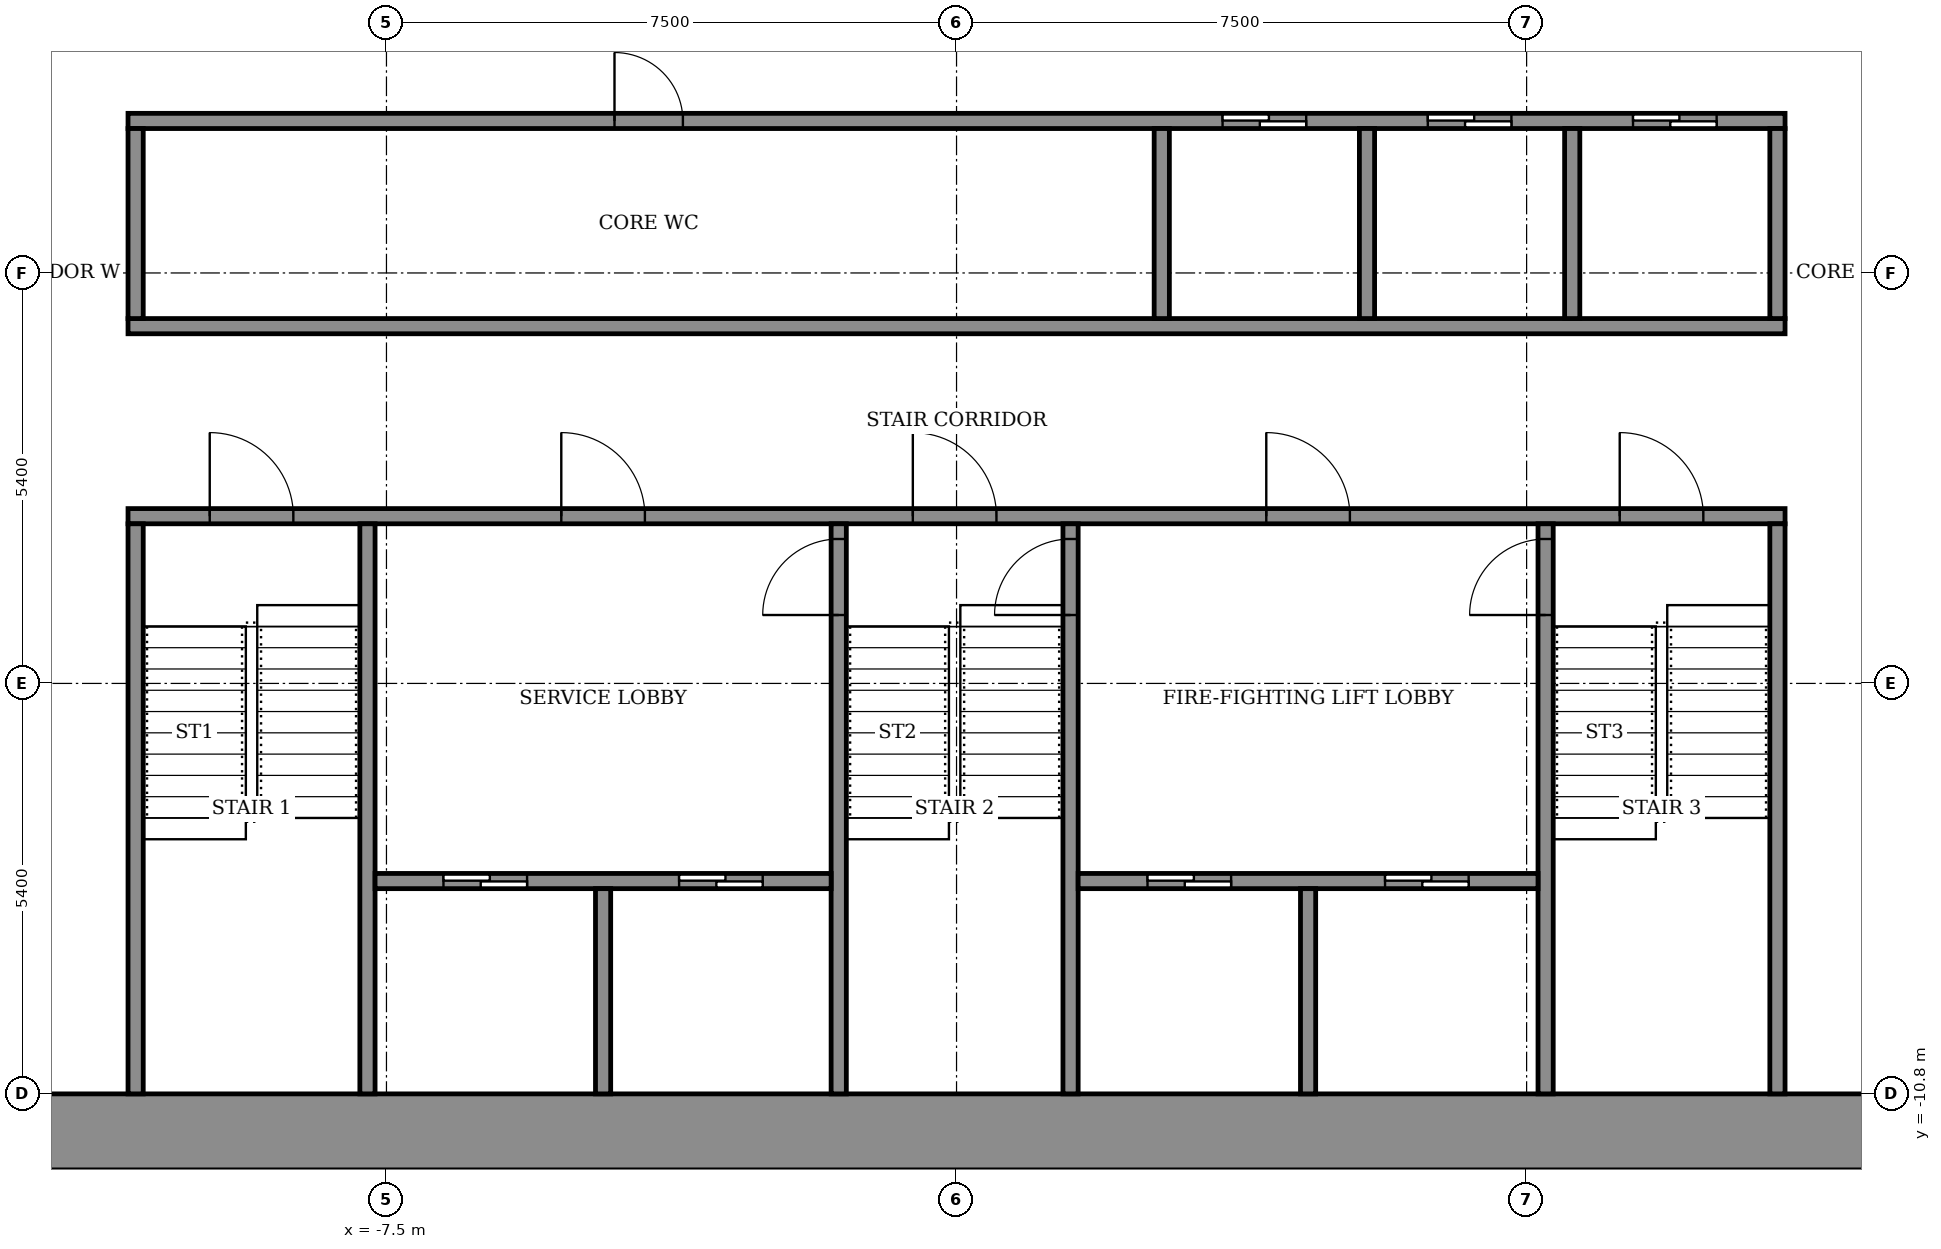
"""IFC4 building model, lengths in metres.
Left out: names, types, materials, properties, quantities, classifications, styles, units other than length and angle.
Written with IfcOpenShell. Run it as: python <this file> out.ifc"""

import sys

from ifc_helpers import new_model, si_unit, direction, frame, frame_2d, origin, place, context, subcontext, project, spatial, rectangle, extrude, element, fill, save


model = new_model("IFC4")
c1 = context("Model", 3, precision=1e-05, world=origin(), true_north=direction((0.0, 1.0)))
c2 = subcontext(c1, "Body", "Model", "MODEL_VIEW")
j1 = project(units=[si_unit("LENGTHUNIT", "METRE"), si_unit("PLANEANGLEUNIT", "RADIAN")], contexts=[c1])
p1 = place(None, origin())
s1 = spatial("IfcSite", under=j1, at=p1, CompositionType="ELEMENT")
p2 = place(p1, origin())
s2 = spatial("IfcBuilding", under=s1, at=p2, CompositionType="ELEMENT")
p3 = place(p2, frame((0.0, 0.0, 137.3)))
s3 = spatial("IfcBuildingStorey", under=s2, at=p3, CompositionType="ELEMENT", Elevation=137.3)
p4 = place(p3, frame((-14.8, -11.3, 0.0), z_axis=(0.0, 0.0, 1.0), x_axis=(1.0, 0.0, 0.0)))
e1 = element("IfcWall", 1, at=p4, inside=s3, PredefinedType="SHEAR", context=c2, shape_type="SweptSolid", body=[
    extrude(rectangle(XDim=29.6, YDim=1.0, at=frame_2d((14.8, 0.0))), origin(), (0.0, 0.0, 1.0), 3.6),
])
p5 = place(p3, frame((-10.9, -3.2, 0.0), z_axis=(0.0, 0.0, 1.0), x_axis=(1.0, 0.0, 0.0)))
e2 = element("IfcWall", 2, at=p5, inside=s3, PredefinedType="SHEAR", context=c2, shape_type="SweptSolid", body=[
    extrude(rectangle(XDim=21.8, YDim=0.2, at=frame_2d((10.9, 0.0))), origin(), (0.0, 0.0, 1.0), 3.05),
])
p6 = place(p5, frame((1.075, 0.0, 0.0)))
e3 = element("IfcOpeningElement", 3, at=p6, cuts=e2, PredefinedType="OPENING", context=c2, shape_type="SweptSolid", body=[
    extrude(rectangle(XDim=1.1, YDim=2.1, at=frame_2d((0.55, 1.05))), frame((0.0, 0.11, 0.0), z_axis=(0.0, -1.0, 0.0), x_axis=(1.0, 0.0, 0.0)), (0.0, 0.0, 1.0), 0.22),
])
p7 = place(p5, frame((10.325, 0.0, 0.0)))
e4 = element("IfcOpeningElement", 4, at=p7, cuts=e2, PredefinedType="OPENING", context=c2, shape_type="SweptSolid", body=[
    extrude(rectangle(XDim=1.1, YDim=2.1, at=frame_2d((0.55, 1.05))), frame((0.0, 0.11, 0.0), z_axis=(0.0, -1.0, 0.0), x_axis=(1.0, 0.0, 0.0)), (0.0, 0.0, 1.0), 0.22),
])
p8 = place(p5, frame((19.625, 0.0, 0.0)))
e5 = element("IfcOpeningElement", 5, at=p8, cuts=e2, PredefinedType="OPENING", context=c2, shape_type="SweptSolid", body=[
    extrude(rectangle(XDim=1.1, YDim=2.1, at=frame_2d((0.55, 1.05))), frame((0.0, 0.11, 0.0), z_axis=(0.0, -1.0, 0.0), x_axis=(1.0, 0.0, 0.0)), (0.0, 0.0, 1.0), 0.22),
])
p9 = place(p5, frame((5.7, 0.0, 0.0)))
e6 = element("IfcOpeningElement", 6, at=p9, cuts=e2, PredefinedType="OPENING", context=c2, shape_type="SweptSolid", body=[
    extrude(rectangle(XDim=1.1, YDim=2.1, at=frame_2d((0.55, 1.05))), frame((0.0, 0.11, 0.0), z_axis=(0.0, -1.0, 0.0), x_axis=(1.0, 0.0, 0.0)), (0.0, 0.0, 1.0), 0.22),
])
p10 = place(p5, frame((14.975, 0.0, 0.0)))
e7 = element("IfcOpeningElement", 7, at=p10, cuts=e2, PredefinedType="OPENING", context=c2, shape_type="SweptSolid", body=[
    extrude(rectangle(XDim=1.1, YDim=2.1, at=frame_2d((0.55, 1.05))), frame((0.0, 0.11, 0.0), z_axis=(0.0, -1.0, 0.0), x_axis=(1.0, 0.0, 0.0)), (0.0, 0.0, 1.0), 0.22),
])
p11 = place(p3, frame((-10.9, -0.7, 0.0), z_axis=(0.0, 0.0, 1.0), x_axis=(1.0, 0.0, 0.0)))
e8 = element("IfcWall", 8, at=p11, inside=s3, PredefinedType="SHEAR", context=c2, shape_type="SweptSolid", body=[
    extrude(rectangle(XDim=21.8, YDim=0.2, at=frame_2d((10.9, 0.0))), origin(), (0.0, 0.0, 1.0), 3.05),
])
p12 = place(p3, frame((-10.9, 2.0, 0.0), z_axis=(0.0, 0.0, 1.0), x_axis=(1.0, 0.0, 0.0)))
e9 = element("IfcWall", 9, at=p12, inside=s3, PredefinedType="SHEAR", context=c2, shape_type="SweptSolid", body=[
    extrude(rectangle(XDim=21.8, YDim=0.2, at=frame_2d((10.9, 0.0))), origin(), (0.0, 0.0, 1.0), 3.05),
])
p13 = place(p12, frame((14.4, 0.0, 0.0)))
e10 = element("IfcOpeningElement", 10, at=p13, cuts=e9, PredefinedType="OPENING", context=c2, shape_type="SweptSolid", body=[
    extrude(rectangle(XDim=1.1, YDim=2.1, at=frame_2d((0.55, 1.05))), frame((0.0, 0.11, 0.0), z_axis=(0.0, -1.0, 0.0), x_axis=(1.0, 0.0, 0.0)), (0.0, 0.0, 1.0), 0.22),
])
p14 = place(p12, frame((17.1, 0.0, 0.0)))
e11 = element("IfcOpeningElement", 11, at=p14, cuts=e9, PredefinedType="OPENING", context=c2, shape_type="SweptSolid", body=[
    extrude(rectangle(XDim=1.1, YDim=2.1, at=frame_2d((0.55, 1.05))), frame((0.0, 0.11, 0.0), z_axis=(0.0, -1.0, 0.0), x_axis=(1.0, 0.0, 0.0)), (0.0, 0.0, 1.0), 0.22),
])
p15 = place(p12, frame((19.8, 0.0, 0.0)))
e12 = element("IfcOpeningElement", 12, at=p15, cuts=e9, PredefinedType="OPENING", context=c2, shape_type="SweptSolid", body=[
    extrude(rectangle(XDim=1.1, YDim=2.1, at=frame_2d((0.55, 1.05))), frame((0.0, 0.11, 0.0), z_axis=(0.0, -1.0, 0.0), x_axis=(1.0, 0.0, 0.0)), (0.0, 0.0, 1.0), 0.22),
])
p16 = place(p12, frame((6.4, 0.0, 0.0)))
e13 = element("IfcOpeningElement", 13, at=p16, cuts=e9, PredefinedType="OPENING", context=c2, shape_type="SweptSolid", body=[
    extrude(rectangle(XDim=0.9, YDim=2.1, at=frame_2d((0.45, 1.05))), frame((0.0, 0.11, 0.0), z_axis=(0.0, -1.0, 0.0), x_axis=(1.0, 0.0, 0.0)), (0.0, 0.0, 1.0), 0.22),
])
for number, where, z_axis, x_axis in (
    (14, (-10.8, -10.8, 0.0), (0.0, 0.0, 1.0), (0.0, 1.0, 0.0)),
    (15, (-7.75, -10.8, 0.0), (0.0, 0.0, 1.0), (0.0, 1.0, 0.0)),
):
    element("IfcWall", number, at=place(p3, frame(where, z_axis=z_axis, x_axis=x_axis)), inside=s3, PredefinedType="SHEAR", context=c2, shape_type="SweptSolid", body=[
        extrude(rectangle(XDim=7.5, YDim=0.2, at=frame_2d((3.75, 0.0))), origin(), (0.0, 0.0, 1.0), 3.05),
    ])
p17 = place(p3, frame((-1.55, -10.8, 0.0), z_axis=(0.0, 0.0, 1.0), x_axis=(0.0, 1.0, 0.0)))
e16 = element("IfcWall", 16, at=p17, inside=s3, PredefinedType="SHEAR", context=c2, shape_type="SweptSolid", body=[
    extrude(rectangle(XDim=7.5, YDim=0.2, at=frame_2d((3.75, 0.0))), origin(), (0.0, 0.0, 1.0), 3.05),
])
p18 = place(p17, frame((6.3, 0.0, 0.0)))
e17 = element("IfcOpeningElement", 17, at=p18, cuts=e16, PredefinedType="OPENING", context=c2, shape_type="SweptSolid", body=[
    extrude(rectangle(XDim=1.0, YDim=2.1, at=frame_2d((0.5, 1.05))), frame((0.0, 0.11, 0.0), z_axis=(0.0, -1.0, 0.0), x_axis=(1.0, 0.0, 0.0)), (0.0, 0.0, 1.0), 0.22),
])
p19 = place(p3, frame((1.5, -10.8, 0.0), z_axis=(0.0, 0.0, 1.0), x_axis=(0.0, 1.0, 0.0)))
e18 = element("IfcWall", 18, at=p19, inside=s3, PredefinedType="SHEAR", context=c2, shape_type="SweptSolid", body=[
    extrude(rectangle(XDim=7.5, YDim=0.2, at=frame_2d((3.75, 0.0))), origin(), (0.0, 0.0, 1.0), 3.05),
])
p20 = place(p19, frame((6.3, 0.0, 0.0)))
e19 = element("IfcOpeningElement", 19, at=p20, cuts=e18, PredefinedType="OPENING", context=c2, shape_type="SweptSolid", body=[
    extrude(rectangle(XDim=1.0, YDim=2.1, at=frame_2d((0.5, 1.05))), frame((0.0, 0.11, 0.0), z_axis=(0.0, -1.0, 0.0), x_axis=(1.0, 0.0, 0.0)), (0.0, 0.0, 1.0), 0.22),
])
p21 = place(p3, frame((7.75, -10.8, 0.0), z_axis=(0.0, 0.0, 1.0), x_axis=(0.0, 1.0, 0.0)))
e20 = element("IfcWall", 20, at=p21, inside=s3, PredefinedType="SHEAR", context=c2, shape_type="SweptSolid", body=[
    extrude(rectangle(XDim=7.5, YDim=0.2, at=frame_2d((3.75, 0.0))), origin(), (0.0, 0.0, 1.0), 3.05),
])
p22 = place(p21, frame((6.3, 0.0, 0.0)))
e21 = element("IfcOpeningElement", 21, at=p22, cuts=e20, PredefinedType="OPENING", context=c2, shape_type="SweptSolid", body=[
    extrude(rectangle(XDim=1.0, YDim=2.1, at=frame_2d((0.5, 1.05))), frame((0.0, 0.11, 0.0), z_axis=(0.0, -1.0, 0.0), x_axis=(1.0, 0.0, 0.0)), (0.0, 0.0, 1.0), 0.22),
])
p23 = place(p3, frame((10.8, -10.8, 0.0), z_axis=(0.0, 0.0, 1.0), x_axis=(0.0, 1.0, 0.0)))
e22 = element("IfcWall", 22, at=p23, inside=s3, PredefinedType="SHEAR", context=c2, shape_type="SweptSolid", body=[
    extrude(rectangle(XDim=7.5, YDim=0.2, at=frame_2d((3.75, 0.0))), origin(), (0.0, 0.0, 1.0), 3.05),
])
p24 = place(p3, frame((-7.65, -8.0, 0.0), z_axis=(0.0, 0.0, 1.0), x_axis=(1.0, 0.0, 0.0)))
e23 = element("IfcWall", 23, at=p24, inside=s3, PredefinedType="SHEAR", context=c2, shape_type="SweptSolid", body=[
    extrude(rectangle(XDim=6.0, YDim=0.2, at=frame_2d((3.0, 0.0))), origin(), (0.0, 0.0, 1.0), 3.05),
])
p25 = place(p24, frame((0.9, 0.0, 0.0)))
e24 = element("IfcOpeningElement", 24, at=p25, cuts=e23, PredefinedType="OPENING", context=c2, shape_type="SweptSolid", body=[
    extrude(rectangle(XDim=1.1, YDim=2.1, at=frame_2d((0.55, 1.05))), frame((0.0, 0.11, 0.0), z_axis=(0.0, -1.0, 0.0), x_axis=(1.0, 0.0, 0.0)), (0.0, 0.0, 1.0), 0.22),
])
p26 = place(p24, frame((4.0, 0.0, 0.0)))
e25 = element("IfcOpeningElement", 25, at=p26, cuts=e23, PredefinedType="OPENING", context=c2, shape_type="SweptSolid", body=[
    extrude(rectangle(XDim=1.1, YDim=2.1, at=frame_2d((0.55, 1.05))), frame((0.0, 0.11, 0.0), z_axis=(0.0, -1.0, 0.0), x_axis=(1.0, 0.0, 0.0)), (0.0, 0.0, 1.0), 0.22),
])
p27 = place(p3, frame((-4.65, -10.8, 0.0), z_axis=(0.0, 0.0, 1.0), x_axis=(0.0, 1.0, 0.0)))
e26 = element("IfcWall", 26, at=p27, inside=s3, PredefinedType="SHEAR", context=c2, shape_type="SweptSolid", body=[
    extrude(rectangle(XDim=2.7, YDim=0.2, at=frame_2d((1.35, 0.0))), origin(), (0.0, 0.0, 1.0), 3.05),
])
p28 = place(p3, frame((1.6, -8.0, 0.0), z_axis=(0.0, 0.0, 1.0), x_axis=(1.0, 0.0, 0.0)))
e27 = element("IfcWall", 27, at=p28, inside=s3, PredefinedType="SHEAR", context=c2, shape_type="SweptSolid", body=[
    extrude(rectangle(XDim=6.05, YDim=0.2, at=frame_2d((3.025, 0.0))), origin(), (0.0, 0.0, 1.0), 3.05),
])
p29 = place(p28, frame((0.913, 0.0, 0.0)))
e28 = element("IfcOpeningElement", 28, at=p29, cuts=e27, PredefinedType="OPENING", context=c2, shape_type="SweptSolid", body=[
    extrude(rectangle(XDim=1.1, YDim=2.1, at=frame_2d((0.55, 1.05))), frame((0.0, 0.11, 0.0), z_axis=(0.0, -1.0, 0.0), x_axis=(1.0, 0.0, 0.0)), (0.0, 0.0, 1.0), 0.22),
])
p30 = place(p28, frame((4.038, 0.0, 0.0)))
e29 = element("IfcOpeningElement", 29, at=p30, cuts=e27, PredefinedType="OPENING", context=c2, shape_type="SweptSolid", body=[
    extrude(rectangle(XDim=1.1, YDim=2.1, at=frame_2d((0.55, 1.05))), frame((0.0, 0.11, 0.0), z_axis=(0.0, -1.0, 0.0), x_axis=(1.0, 0.0, 0.0)), (0.0, 0.0, 1.0), 0.22),
])
p31 = place(p3, frame((4.625, -10.8, 0.0), z_axis=(0.0, 0.0, 1.0), x_axis=(0.0, 1.0, 0.0)))
e30 = element("IfcWall", 30, at=p31, inside=s3, PredefinedType="SHEAR", context=c2, shape_type="SweptSolid", body=[
    extrude(rectangle(XDim=2.7, YDim=0.2, at=frame_2d((1.35, 0.0))), origin(), (0.0, 0.0, 1.0), 3.05),
])
p32 = place(p3, frame((-10.8, -0.6, 0.0), z_axis=(0.0, 0.0, 1.0), x_axis=(0.0, 1.0, 0.0)))
e31 = element("IfcWall", 31, at=p32, inside=s3, PredefinedType="STANDARD", context=c2, shape_type="SweptSolid", body=[
    extrude(rectangle(XDim=2.5, YDim=0.2, at=frame_2d((1.25, 0.0))), origin(), (0.0, 0.0, 1.0), 3.05),
])
for number, where, z_axis, x_axis in (
    (32, (2.7, -0.6, 0.0), (0.0, 0.0, 1.0), (0.0, 1.0, 0.0)),
    (33, (5.4, -0.6, 0.0), (0.0, 0.0, 1.0), (0.0, 1.0, 0.0)),
    (34, (8.1, -0.6, 0.0), (0.0, 0.0, 1.0), (0.0, 1.0, 0.0)),
    (35, (10.8, -0.6, 0.0), (0.0, 0.0, 1.0), (0.0, 1.0, 0.0)),
):
    element("IfcWall", number, at=place(p3, frame(where, z_axis=z_axis, x_axis=x_axis)), inside=s3, PredefinedType="SHEAR", context=c2, shape_type="SweptSolid", body=[
        extrude(rectangle(XDim=2.5, YDim=0.2, at=frame_2d((1.25, 0.0))), origin(), (0.0, 0.0, 1.0), 3.05),
    ])
p33 = place(p13, origin())
e36 = element("IfcDoor", 36, at=p33, inside=s3, OperationType="SLIDING_TO_LEFT", PredefinedType="DOOR", context=c2, shape_type="SweptSolid", body=[
    extrude(rectangle(XDim=1.1, YDim=2.1, at=frame_2d((0.55, 1.05))), frame((0.0, 0.025, 0.0), z_axis=(0.0, -1.0, 0.0), x_axis=(1.0, 0.0, 0.0)), (0.0, 0.0, 1.0), 0.05),
])
fill(e10, e36)
p34 = place(p14, origin())
e37 = element("IfcDoor", 37, at=p34, inside=s3, OperationType="SLIDING_TO_LEFT", PredefinedType="DOOR", context=c2, shape_type="SweptSolid", body=[
    extrude(rectangle(XDim=1.1, YDim=2.1, at=frame_2d((0.55, 1.05))), frame((0.0, 0.025, 0.0), z_axis=(0.0, -1.0, 0.0), x_axis=(1.0, 0.0, 0.0)), (0.0, 0.0, 1.0), 0.05),
])
fill(e11, e37)
p35 = place(p15, origin())
e38 = element("IfcDoor", 38, at=p35, inside=s3, OperationType="SLIDING_TO_LEFT", PredefinedType="DOOR", context=c2, shape_type="SweptSolid", body=[
    extrude(rectangle(XDim=1.1, YDim=2.1, at=frame_2d((0.55, 1.05))), frame((0.0, 0.025, 0.0), z_axis=(0.0, -1.0, 0.0), x_axis=(1.0, 0.0, 0.0)), (0.0, 0.0, 1.0), 0.05),
])
fill(e12, e38)
p36 = place(p16, origin())
e39 = element("IfcDoor", 39, at=p36, inside=s3, OperationType="SINGLE_SWING_RIGHT", PredefinedType="DOOR", context=c2, shape_type="SweptSolid", body=[
    extrude(rectangle(XDim=0.9, YDim=2.1, at=frame_2d((0.45, 1.05))), frame((0.0, 0.025, 0.0), z_axis=(0.0, -1.0, 0.0), x_axis=(1.0, 0.0, 0.0)), (0.0, 0.0, 1.0), 0.05),
])
fill(e13, e39)
p37 = place(p29, origin())
e40 = element("IfcDoor", 40, at=p37, inside=s3, OperationType="SLIDING_TO_LEFT", PredefinedType="DOOR", context=c2, shape_type="SweptSolid", body=[
    extrude(rectangle(XDim=1.1, YDim=2.1, at=frame_2d((0.55, 1.05))), frame((0.0, 0.025, 0.0), z_axis=(0.0, -1.0, 0.0), x_axis=(1.0, 0.0, 0.0)), (0.0, 0.0, 1.0), 0.05),
])
fill(e28, e40)
p38 = place(p25, origin())
e41 = element("IfcDoor", 41, at=p38, inside=s3, OperationType="SLIDING_TO_LEFT", PredefinedType="DOOR", context=c2, shape_type="SweptSolid", body=[
    extrude(rectangle(XDim=1.1, YDim=2.1, at=frame_2d((0.55, 1.05))), frame((0.0, 0.025, 0.0), z_axis=(0.0, -1.0, 0.0), x_axis=(1.0, 0.0, 0.0)), (0.0, 0.0, 1.0), 0.05),
])
fill(e24, e41)
p39 = place(p30, origin())
e42 = element("IfcDoor", 42, at=p39, inside=s3, OperationType="SLIDING_TO_LEFT", PredefinedType="DOOR", context=c2, shape_type="SweptSolid", body=[
    extrude(rectangle(XDim=1.1, YDim=2.1, at=frame_2d((0.55, 1.05))), frame((0.0, 0.025, 0.0), z_axis=(0.0, -1.0, 0.0), x_axis=(1.0, 0.0, 0.0)), (0.0, 0.0, 1.0), 0.05),
])
fill(e29, e42)
p40 = place(p26, origin())
e43 = element("IfcDoor", 43, at=p40, inside=s3, OperationType="SLIDING_TO_LEFT", PredefinedType="DOOR", context=c2, shape_type="SweptSolid", body=[
    extrude(rectangle(XDim=1.1, YDim=2.1, at=frame_2d((0.55, 1.05))), frame((0.0, 0.025, 0.0), z_axis=(0.0, -1.0, 0.0), x_axis=(1.0, 0.0, 0.0)), (0.0, 0.0, 1.0), 0.05),
])
fill(e25, e43)
p41 = place(p6, origin())
e44 = element("IfcDoor", 44, at=p41, inside=s3, OperationType="SINGLE_SWING_RIGHT", PredefinedType="DOOR", context=c2, shape_type="SweptSolid", body=[
    extrude(rectangle(XDim=1.1, YDim=2.1, at=frame_2d((0.55, 1.05))), frame((0.0, 0.025, 0.0), z_axis=(0.0, -1.0, 0.0), x_axis=(1.0, 0.0, 0.0)), (0.0, 0.0, 1.0), 0.05),
])
fill(e3, e44)
p42 = place(p7, origin())
e45 = element("IfcDoor", 45, at=p42, inside=s3, OperationType="SINGLE_SWING_RIGHT", PredefinedType="DOOR", context=c2, shape_type="SweptSolid", body=[
    extrude(rectangle(XDim=1.1, YDim=2.1, at=frame_2d((0.55, 1.05))), frame((0.0, 0.025, 0.0), z_axis=(0.0, -1.0, 0.0), x_axis=(1.0, 0.0, 0.0)), (0.0, 0.0, 1.0), 0.05),
])
fill(e4, e45)
p43 = place(p8, origin())
e46 = element("IfcDoor", 46, at=p43, inside=s3, OperationType="SINGLE_SWING_RIGHT", PredefinedType="DOOR", context=c2, shape_type="SweptSolid", body=[
    extrude(rectangle(XDim=1.1, YDim=2.1, at=frame_2d((0.55, 1.05))), frame((0.0, 0.025, 0.0), z_axis=(0.0, -1.0, 0.0), x_axis=(1.0, 0.0, 0.0)), (0.0, 0.0, 1.0), 0.05),
])
fill(e5, e46)
p44 = place(p9, origin())
e47 = element("IfcDoor", 47, at=p44, inside=s3, OperationType="SINGLE_SWING_LEFT", PredefinedType="DOOR", context=c2, shape_type="SweptSolid", body=[
    extrude(rectangle(XDim=1.1, YDim=2.1, at=frame_2d((0.55, 1.05))), frame((0.0, 0.025, 0.0), z_axis=(0.0, -1.0, 0.0), x_axis=(1.0, 0.0, 0.0)), (0.0, 0.0, 1.0), 0.05),
])
fill(e6, e47)
p45 = place(p10, origin())
e48 = element("IfcDoor", 48, at=p45, inside=s3, OperationType="SINGLE_SWING_LEFT", PredefinedType="DOOR", context=c2, shape_type="SweptSolid", body=[
    extrude(rectangle(XDim=1.1, YDim=2.1, at=frame_2d((0.55, 1.05))), frame((0.0, 0.025, 0.0), z_axis=(0.0, -1.0, 0.0), x_axis=(1.0, 0.0, 0.0)), (0.0, 0.0, 1.0), 0.05),
])
fill(e7, e48)
p46 = place(p18, origin())
e49 = element("IfcDoor", 49, at=p46, inside=s3, OperationType="SINGLE_SWING_RIGHT", PredefinedType="DOOR", context=c2, shape_type="SweptSolid", body=[
    extrude(rectangle(XDim=1.0, YDim=2.1, at=frame_2d((0.5, 1.05))), frame((0.0, 0.025, 0.0), z_axis=(0.0, -1.0, 0.0), x_axis=(1.0, 0.0, 0.0)), (0.0, 0.0, 1.0), 0.05),
])
fill(e17, e49)
p47 = place(p20, origin())
e50 = element("IfcDoor", 50, at=p47, inside=s3, OperationType="SINGLE_SWING_RIGHT", PredefinedType="DOOR", context=c2, shape_type="SweptSolid", body=[
    extrude(rectangle(XDim=1.0, YDim=2.1, at=frame_2d((0.5, 1.05))), frame((0.0, 0.025, 0.0), z_axis=(0.0, -1.0, 0.0), x_axis=(1.0, 0.0, 0.0)), (0.0, 0.0, 1.0), 0.05),
])
fill(e19, e50)
p48 = place(p22, origin())
e51 = element("IfcDoor", 51, at=p48, inside=s3, OperationType="SINGLE_SWING_RIGHT", PredefinedType="DOOR", context=c2, shape_type="SweptSolid", body=[
    extrude(rectangle(XDim=1.0, YDim=2.1, at=frame_2d((0.5, 1.05))), frame((0.0, 0.025, 0.0), z_axis=(0.0, -1.0, 0.0), x_axis=(1.0, 0.0, 0.0)), (0.0, 0.0, 1.0), 0.05),
])
fill(e21, e51)
save(model, sys.argv[1])
